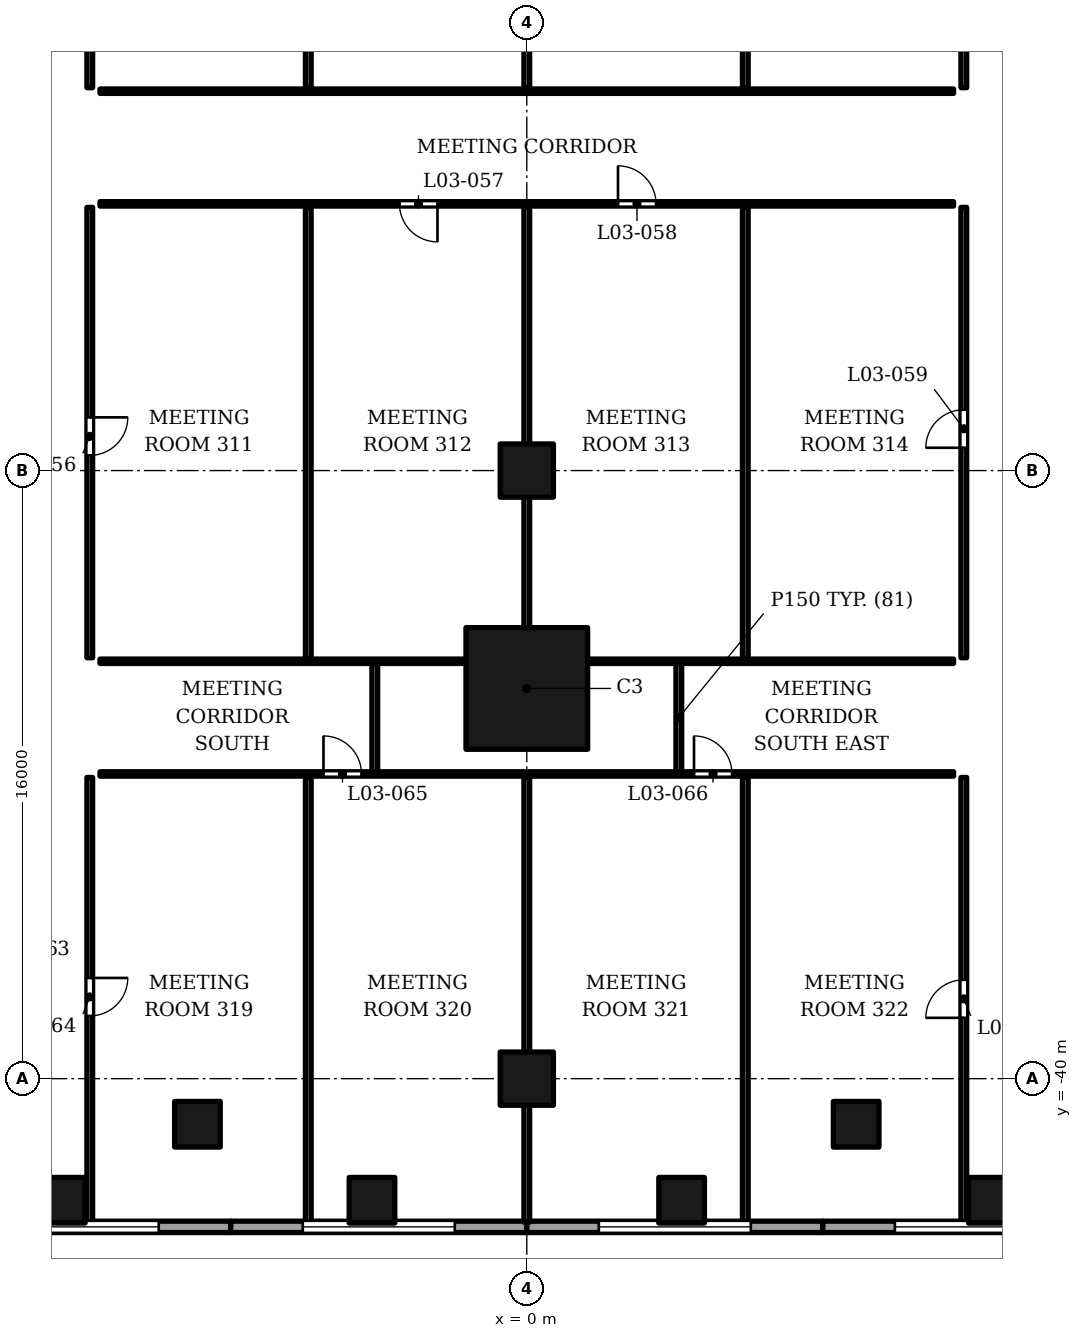
"""IFC4 building model, lengths in metres.
Left out: names, types, materials, properties, quantities, classifications, styles, units other than length and angle.
Written with IfcOpenShell. Run it as: python <this file> out.ifc"""

import sys

from ifc_helpers import new_model, si_unit, direction, frame, frame_2d, origin, origin_2d, place, context, subcontext, project, spatial, rectangle, extrude, element, fill, save


model = new_model("IFC4")
c1 = context("Model", 3, precision=1e-05, world=origin(), true_north=direction((0.0, 1.0)))
c2 = subcontext(c1, "Body", "Model", "MODEL_VIEW")
j1 = project(units=[si_unit("LENGTHUNIT", "METRE"), si_unit("PLANEANGLEUNIT", "RADIAN")], contexts=[c1])
p1 = place(None, origin())
s1 = spatial("IfcSite", under=j1, at=p1, CompositionType="ELEMENT")
p2 = place(p1, origin())
s2 = spatial("IfcBuilding", under=s1, at=p2, CompositionType="ELEMENT")
p3 = place(p2, frame((0.0, 0.0, 29.0)))
s3 = spatial("IfcBuildingStorey", under=s2, at=p3, CompositionType="ELEMENT", Elevation=29.0)
for number, where, z_axis, x_axis in (
    (1, (0.0, -40.0, 0.0), (0.0, 0.0, 1.0), (1.0, 0.0, 0.0)),
    (2, (0.0, -24.0, 0.0), (0.0, 0.0, 1.0), (1.0, 0.0, 0.0)),
):
    element("IfcColumn", number, at=place(p3, frame(where, z_axis=z_axis, x_axis=x_axis)), inside=s3, PredefinedType="COLUMN", context=c2, shape_type="SweptSolid", body=[
        extrude(rectangle(XDim=1.4, YDim=1.4, at=origin_2d()), origin(), (0.0, 0.0, 1.0), 5.5),
    ])
for number, where, z_axis, x_axis in (
    (3, (8.667, -41.2, 0.0), (0.0, 0.0, 1.0), (1.0, 0.0, 0.0)),
    (4, (-8.667, -41.2, 0.0), (0.0, 0.0, 1.0), (1.0, 0.0, 0.0)),
    (5, (12.223, -43.2, 0.0), (0.0, 0.0, 1.0), (1.0, 0.0, 0.0)),
    (6, (4.074, -43.2, 0.0), (0.0, 0.0, 1.0), (1.0, 0.0, 0.0)),
    (7, (-4.074, -43.2, 0.0), (0.0, 0.0, 1.0), (1.0, 0.0, 0.0)),
    (8, (-12.223, -43.2, 0.0), (0.0, 0.0, 1.0), (1.0, 0.0, 0.0)),
):
    element("IfcColumn", number, at=place(p3, frame(where, z_axis=z_axis, x_axis=x_axis)), inside=s3, PredefinedType="COLUMN", context=c2, shape_type="SweptSolid", body=[
        extrude(rectangle(XDim=1.2, YDim=1.2, at=origin_2d()), origin(), (0.0, 0.0, 1.0), 5.5),
    ])
p4 = place(p3, frame((0.0, -29.733, 0.0), z_axis=(0.0, 0.0, 1.0), x_axis=(0.0, 1.0, 0.0)))
e9 = element("IfcColumn", 9, at=p4, inside=s3, PredefinedType="COLUMN", context=c2, shape_type="SweptSolid", body=[
    extrude(rectangle(XDim=3.2, YDim=3.2, at=origin_2d()), origin(), (0.0, 0.0, 1.0), 5.5),
])
p5 = place(p3, frame((-15.58, -43.9, 0.0), z_axis=(0.0, 0.0, 1.0), x_axis=(1.0, 0.0, 0.0)))
e10 = element("IfcWall", 10, at=p5, inside=s3, PredefinedType="SOLIDWALL", context=c2, shape_type="SweptSolid", body=[
    extrude(rectangle(XDim=7.79, YDim=0.3, at=frame_2d((3.895, 0.0))), origin(), (0.0, 0.0, 1.0), 4.1),
])
p6 = place(p5, frame((1.895, 0.0, 1.0)))
e11 = element("IfcOpeningElement", 11, at=p6, cuts=e10, PredefinedType="OPENING", context=c2, shape_type="SweptSolid", body=[
    extrude(rectangle(XDim=4.0, YDim=1.8, at=frame_2d((2.0, 0.9))), frame((0.0, 0.16, 0.0), z_axis=(0.0, -1.0, 0.0), x_axis=(1.0, 0.0, 0.0)), (0.0, 0.0, 1.0), 0.32),
])
p7 = place(p3, frame((-7.79, -43.9, 0.0), z_axis=(0.0, 0.0, 1.0), x_axis=(1.0, 0.0, 0.0)))
e12 = element("IfcWall", 12, at=p7, inside=s3, PredefinedType="SOLIDWALL", context=c2, shape_type="SweptSolid", body=[
    extrude(rectangle(XDim=7.79, YDim=0.3, at=frame_2d((3.895, 0.0))), origin(), (0.0, 0.0, 1.0), 4.1),
])
p8 = place(p7, frame((1.895, 0.0, 1.0)))
e13 = element("IfcOpeningElement", 13, at=p8, cuts=e12, PredefinedType="OPENING", context=c2, shape_type="SweptSolid", body=[
    extrude(rectangle(XDim=4.0, YDim=1.8, at=frame_2d((2.0, 0.9))), frame((0.0, 0.16, 0.0), z_axis=(0.0, -1.0, 0.0), x_axis=(1.0, 0.0, 0.0)), (0.0, 0.0, 1.0), 0.32),
])
p9 = place(p3, frame((0.0, -43.9, 0.0), z_axis=(0.0, 0.0, 1.0), x_axis=(1.0, 0.0, 0.0)))
e14 = element("IfcWall", 14, at=p9, inside=s3, PredefinedType="SOLIDWALL", context=c2, shape_type="SweptSolid", body=[
    extrude(rectangle(XDim=7.79, YDim=0.3, at=frame_2d((3.895, 0.0))), origin(), (0.0, 0.0, 1.0), 4.1),
])
p10 = place(p9, frame((1.895, 0.0, 1.0)))
e15 = element("IfcOpeningElement", 15, at=p10, cuts=e14, PredefinedType="OPENING", context=c2, shape_type="SweptSolid", body=[
    extrude(rectangle(XDim=4.0, YDim=1.8, at=frame_2d((2.0, 0.9))), frame((0.0, 0.16, 0.0), z_axis=(0.0, -1.0, 0.0), x_axis=(1.0, 0.0, 0.0)), (0.0, 0.0, 1.0), 0.32),
])
p11 = place(p3, frame((7.79, -43.9, 0.0), z_axis=(0.0, 0.0, 1.0), x_axis=(1.0, 0.0, 0.0)))
e16 = element("IfcWall", 16, at=p11, inside=s3, PredefinedType="SOLIDWALL", context=c2, shape_type="SweptSolid", body=[
    extrude(rectangle(XDim=7.79, YDim=0.3, at=frame_2d((3.895, 0.0))), origin(), (0.0, 0.0, 1.0), 4.1),
])
p12 = place(p11, frame((1.895, 0.0, 1.0)))
e17 = element("IfcOpeningElement", 17, at=p12, cuts=e16, PredefinedType="OPENING", context=c2, shape_type="SweptSolid", body=[
    extrude(rectangle(XDim=4.0, YDim=1.8, at=frame_2d((2.0, 0.9))), frame((0.0, 0.16, 0.0), z_axis=(0.0, -1.0, 0.0), x_axis=(1.0, 0.0, 0.0)), (0.0, 0.0, 1.0), 0.32),
])
p13 = place(p3, frame((-11.5, -43.77, 0.0), z_axis=(0.0, 0.0, 1.0), x_axis=(0.0, 1.0, 0.0)))
e18 = element("IfcWall", 18, at=p13, inside=s3, PredefinedType="PARTITIONING", context=c2, shape_type="SweptSolid", body=[
    extrude(rectangle(XDim=11.695, YDim=0.15, at=frame_2d((5.848, 0.0))), origin(), (0.0, 0.0, 1.0), 3.85),
])
p14 = place(p13, frame((5.42, 0.0, 0.0)))
e19 = element("IfcOpeningElement", 19, at=p14, cuts=e18, PredefinedType="OPENING", context=c2, shape_type="SweptSolid", body=[
    extrude(rectangle(XDim=1.0, YDim=2.1, at=frame_2d((0.5, 1.05))), frame((0.0, 0.085, 0.0), z_axis=(0.0, -1.0, 0.0), x_axis=(1.0, 0.0, 0.0)), (0.0, 0.0, 1.0), 0.17),
])
p15 = place(p3, frame((-5.75, -43.77, 0.0), z_axis=(0.0, 0.0, 1.0), x_axis=(0.0, 1.0, 0.0)))
e20 = element("IfcWall", 20, at=p15, inside=s3, PredefinedType="PARTITIONING", context=c2, shape_type="SweptSolid", body=[
    extrude(rectangle(XDim=11.695, YDim=0.15, at=frame_2d((5.848, 0.0))), origin(), (0.0, 0.0, 1.0), 3.85),
])
p16 = place(p3, frame((0.0, -43.775, 0.0), z_axis=(0.0, 0.0, 1.0), x_axis=(0.0, 1.0, 0.0)))
e21 = element("IfcWall", 21, at=p16, inside=s3, PredefinedType="PARTITIONING", context=c2, shape_type="SweptSolid", body=[
    extrude(rectangle(XDim=3.075, YDim=0.15, at=frame_2d((1.538, 0.0))), origin(), (0.0, 0.0, 1.0), 3.85),
])
p17 = place(p3, frame((5.75, -43.77, 0.0), z_axis=(0.0, 0.0, 1.0), x_axis=(0.0, 1.0, 0.0)))
e22 = element("IfcWall", 22, at=p17, inside=s3, PredefinedType="PARTITIONING", context=c2, shape_type="SweptSolid", body=[
    extrude(rectangle(XDim=11.695, YDim=0.15, at=frame_2d((5.848, 0.0))), origin(), (0.0, 0.0, 1.0), 3.85),
])
p18 = place(p3, frame((11.5, -43.77, 0.0), z_axis=(0.0, 0.0, 1.0), x_axis=(0.0, 1.0, 0.0)))
e23 = element("IfcWall", 23, at=p18, inside=s3, PredefinedType="PARTITIONING", context=c2, shape_type="SweptSolid", body=[
    extrude(rectangle(XDim=11.695, YDim=0.15, at=frame_2d((5.848, 0.0))), origin(), (0.0, 0.0, 1.0), 3.85),
])
p19 = place(p18, frame((5.37, 0.0, 0.0)))
e24 = element("IfcOpeningElement", 24, at=p19, cuts=e23, PredefinedType="OPENING", context=c2, shape_type="SweptSolid", body=[
    extrude(rectangle(XDim=1.0, YDim=2.1, at=frame_2d((0.5, 1.05))), frame((0.0, 0.085, 0.0), z_axis=(0.0, -1.0, 0.0), x_axis=(1.0, 0.0, 0.0)), (0.0, 0.0, 1.0), 0.17),
])
p20 = place(p3, frame((0.0, -39.3, 0.0), z_axis=(0.0, 0.0, 1.0), x_axis=(0.0, 1.0, 0.0)))
e25 = element("IfcWall", 25, at=p20, inside=s3, PredefinedType="PARTITIONING", context=c2, shape_type="SweptSolid", body=[
    extrude(rectangle(XDim=7.225, YDim=0.15, at=frame_2d((3.613, 0.0))), origin(), (0.0, 0.0, 1.0), 3.85),
])
p21 = place(p3, frame((-11.23, -31.982, 0.0), z_axis=(0.0, 0.0, 1.0), x_axis=(1.0, 0.0, 0.0)))
e26 = element("IfcWall", 26, at=p21, inside=s3, PredefinedType="PARTITIONING", context=c2, shape_type="SweptSolid", body=[
    extrude(rectangle(XDim=22.46, YDim=0.115, at=frame_2d((11.23, 0.0))), origin(), (0.0, 0.0, 1.0), 3.85),
])
p22 = place(p21, frame((5.88, 0.0, 0.0)))
e27 = element("IfcOpeningElement", 27, at=p22, cuts=e26, PredefinedType="OPENING", context=c2, shape_type="SweptSolid", body=[
    extrude(rectangle(XDim=1.0, YDim=2.1, at=frame_2d((0.5, 1.05))), frame((0.0, 0.067, 0.0), z_axis=(0.0, -1.0, 0.0), x_axis=(1.0, 0.0, 0.0)), (0.0, 0.0, 1.0), 0.135),
])
p23 = place(p21, frame((15.63, 0.0, 0.0)))
e28 = element("IfcOpeningElement", 28, at=p23, cuts=e26, PredefinedType="OPENING", context=c2, shape_type="SweptSolid", body=[
    extrude(rectangle(XDim=1.0, YDim=2.1, at=frame_2d((0.5, 1.05))), frame((0.0, 0.067, 0.0), z_axis=(0.0, -1.0, 0.0), x_axis=(1.0, 0.0, 0.0)), (0.0, 0.0, 1.0), 0.135),
])
for number, where, z_axis, x_axis in (
    (29, (-4.0, -31.925, 0.0), (0.0, 0.0, 1.0), (0.0, 1.0, 0.0)),
    (30, (4.0, -31.925, 0.0), (0.0, 0.0, 1.0), (0.0, 1.0, 0.0)),
):
    element("IfcWall", number, at=place(p3, frame(where, z_axis=z_axis, x_axis=x_axis)), inside=s3, PredefinedType="PARTITIONING", context=c2, shape_type="SweptSolid", body=[
        extrude(rectangle(XDim=2.85, YDim=0.15, at=frame_2d((1.425, 0.0))), origin(), (0.0, 0.0, 1.0), 5.05),
    ])
for number, where, z_axis, x_axis in (
    (31, (-11.23, -29.018, 0.0), (0.0, 0.0, 1.0), (1.0, 0.0, 0.0)),
    (32, (1.6, -29.018, 0.0), (0.0, 0.0, 1.0), (1.0, 0.0, 0.0)),
):
    element("IfcWall", number, at=place(p3, frame(where, z_axis=z_axis, x_axis=x_axis)), inside=s3, PredefinedType="PARTITIONING", context=c2, shape_type="SweptSolid", body=[
        extrude(rectangle(XDim=9.63, YDim=0.115, at=frame_2d((4.815, 0.0))), origin(), (0.0, 0.0, 1.0), 4.15),
    ])
p24 = place(p3, frame((-11.5, -28.925, 0.0), z_axis=(0.0, 0.0, 1.0), x_axis=(0.0, 1.0, 0.0)))
e33 = element("IfcWall", 33, at=p24, inside=s3, PredefinedType="PARTITIONING", context=c2, shape_type="SweptSolid", body=[
    extrude(rectangle(XDim=11.85, YDim=0.15, at=frame_2d((5.925, 0.0))), origin(), (0.0, 0.0, 1.0), 3.85),
])
p25 = place(p24, frame((5.325, 0.0, 0.0)))
e34 = element("IfcOpeningElement", 34, at=p25, cuts=e33, PredefinedType="OPENING", context=c2, shape_type="SweptSolid", body=[
    extrude(rectangle(XDim=1.0, YDim=2.1, at=frame_2d((0.5, 1.05))), frame((0.0, 0.085, 0.0), z_axis=(0.0, -1.0, 0.0), x_axis=(1.0, 0.0, 0.0)), (0.0, 0.0, 1.0), 0.17),
])
for number, where, z_axis, x_axis in (
    (35, (-5.75, -28.925, 0.0), (0.0, 0.0, 1.0), (0.0, 1.0, 0.0)),
    (36, (5.75, -28.925, 0.0), (0.0, 0.0, 1.0), (0.0, 1.0, 0.0)),
):
    element("IfcWall", number, at=place(p3, frame(where, z_axis=z_axis, x_axis=x_axis)), inside=s3, PredefinedType="PARTITIONING", context=c2, shape_type="SweptSolid", body=[
        extrude(rectangle(XDim=11.85, YDim=0.15, at=frame_2d((5.925, 0.0))), origin(), (0.0, 0.0, 1.0), 3.85),
    ])
p26 = place(p3, frame((11.5, -28.925, 0.0), z_axis=(0.0, 0.0, 1.0), x_axis=(0.0, 1.0, 0.0)))
e37 = element("IfcWall", 37, at=p26, inside=s3, PredefinedType="PARTITIONING", context=c2, shape_type="SweptSolid", body=[
    extrude(rectangle(XDim=11.85, YDim=0.15, at=frame_2d((5.925, 0.0))), origin(), (0.0, 0.0, 1.0), 3.85),
])
p27 = place(p26, frame((5.525, 0.0, 0.0)))
e38 = element("IfcOpeningElement", 38, at=p27, cuts=e37, PredefinedType="OPENING", context=c2, shape_type="SweptSolid", body=[
    extrude(rectangle(XDim=1.0, YDim=2.1, at=frame_2d((0.5, 1.05))), frame((0.0, 0.085, 0.0), z_axis=(0.0, -1.0, 0.0), x_axis=(1.0, 0.0, 0.0)), (0.0, 0.0, 1.0), 0.17),
])
p28 = place(p3, frame((0.0, -28.133, 0.0), z_axis=(0.0, 0.0, 1.0), x_axis=(0.0, 1.0, 0.0)))
e39 = element("IfcWall", 39, at=p28, inside=s3, PredefinedType="PARTITIONING", context=c2, shape_type="SweptSolid", body=[
    extrude(rectangle(XDim=3.433, YDim=0.15, at=frame_2d((1.717, 0.0))), origin(), (0.0, 0.0, 1.0), 3.85),
])
p29 = place(p3, frame((0.0, -23.3, 0.0), z_axis=(0.0, 0.0, 1.0), x_axis=(0.0, 1.0, 0.0)))
e40 = element("IfcWall", 40, at=p29, inside=s3, PredefinedType="PARTITIONING", context=c2, shape_type="SweptSolid", body=[
    extrude(rectangle(XDim=6.225, YDim=0.15, at=frame_2d((3.113, 0.0))), origin(), (0.0, 0.0, 1.0), 3.85),
])
p30 = place(p3, frame((-11.23, -16.982, 0.0), z_axis=(0.0, 0.0, 1.0), x_axis=(1.0, 0.0, 0.0)))
e41 = element("IfcWall", 41, at=p30, inside=s3, PredefinedType="PARTITIONING", context=c2, shape_type="SweptSolid", body=[
    extrude(rectangle(XDim=22.46, YDim=0.115, at=frame_2d((11.23, 0.0))), origin(), (0.0, 0.0, 1.0), 3.85),
])
p31 = place(p30, frame((7.88, 0.0, 0.0)))
e42 = element("IfcOpeningElement", 42, at=p31, cuts=e41, PredefinedType="OPENING", context=c2, shape_type="SweptSolid", body=[
    extrude(rectangle(XDim=1.0, YDim=2.1, at=frame_2d((0.5, 1.05))), frame((0.0, 0.067, 0.0), z_axis=(0.0, -1.0, 0.0), x_axis=(1.0, 0.0, 0.0)), (0.0, 0.0, 1.0), 0.135),
])
p32 = place(p30, frame((13.63, 0.0, 0.0)))
e43 = element("IfcOpeningElement", 43, at=p32, cuts=e41, PredefinedType="OPENING", context=c2, shape_type="SweptSolid", body=[
    extrude(rectangle(XDim=1.0, YDim=2.1, at=frame_2d((0.5, 1.05))), frame((0.0, 0.067, 0.0), z_axis=(0.0, -1.0, 0.0), x_axis=(1.0, 0.0, 0.0)), (0.0, 0.0, 1.0), 0.135),
])
p33 = place(p3, frame((-11.23, -14.018, 0.0), z_axis=(0.0, 0.0, 1.0), x_axis=(1.0, 0.0, 0.0)))
e44 = element("IfcWall", 44, at=p33, inside=s3, PredefinedType="PARTITIONING", context=c2, shape_type="SweptSolid", body=[
    extrude(rectangle(XDim=22.46, YDim=0.115, at=frame_2d((11.23, 0.0))), origin(), (0.0, 0.0, 1.0), 3.85),
])
p34 = place(p3, frame((-11.5, -13.925, 0.0), z_axis=(0.0, 0.0, 1.0), x_axis=(0.0, 1.0, 0.0)))
e45 = element("IfcWall", 45, at=p34, inside=s3, PredefinedType="PARTITIONING", context=c2, shape_type="SweptSolid", body=[
    extrude(rectangle(XDim=11.85, YDim=0.15, at=frame_2d((5.925, 0.0))), origin(), (0.0, 0.0, 1.0), 3.85),
])
p35 = place(p34, frame((5.325, 0.0, 0.0)))
e46 = element("IfcOpeningElement", 46, at=p35, cuts=e45, PredefinedType="OPENING", context=c2, shape_type="SweptSolid", body=[
    extrude(rectangle(XDim=1.0, YDim=2.1, at=frame_2d((0.5, 1.05))), frame((0.0, 0.085, 0.0), z_axis=(0.0, -1.0, 0.0), x_axis=(1.0, 0.0, 0.0)), (0.0, 0.0, 1.0), 0.17),
])
p36 = place(p3, frame((-5.75, -13.925, 0.0), z_axis=(0.0, 0.0, 1.0), x_axis=(0.0, 1.0, 0.0)))
e47 = element("IfcWall", 47, at=p36, inside=s3, PredefinedType="PARTITIONING", context=c2, shape_type="SweptSolid", body=[
    extrude(rectangle(XDim=11.85, YDim=0.15, at=frame_2d((5.925, 0.0))), origin(), (0.0, 0.0, 1.0), 3.85),
])
p37 = place(p3, frame((0.0, -13.925, 0.0), z_axis=(0.0, 0.0, 1.0), x_axis=(0.0, 1.0, 0.0)))
e48 = element("IfcWall", 48, at=p37, inside=s3, PredefinedType="PARTITIONING", context=c2, shape_type="SweptSolid", body=[
    extrude(rectangle(XDim=1.125, YDim=0.15, at=frame_2d((0.562, 0.0))), origin(), (0.0, 0.0, 1.0), 3.85),
])
p38 = place(p3, frame((5.75, -13.925, 0.0), z_axis=(0.0, 0.0, 1.0), x_axis=(0.0, 1.0, 0.0)))
e49 = element("IfcWall", 49, at=p38, inside=s3, PredefinedType="PARTITIONING", context=c2, shape_type="SweptSolid", body=[
    extrude(rectangle(XDim=11.85, YDim=0.15, at=frame_2d((5.925, 0.0))), origin(), (0.0, 0.0, 1.0), 3.85),
])
p39 = place(p3, frame((11.5, -13.925, 0.0), z_axis=(0.0, 0.0, 1.0), x_axis=(0.0, 1.0, 0.0)))
e50 = element("IfcWall", 50, at=p39, inside=s3, PredefinedType="PARTITIONING", context=c2, shape_type="SweptSolid", body=[
    extrude(rectangle(XDim=11.85, YDim=0.15, at=frame_2d((5.925, 0.0))), origin(), (0.0, 0.0, 1.0), 3.85),
])
p40 = place(p39, frame((5.525, 0.0, 0.0)))
e51 = element("IfcOpeningElement", 51, at=p40, cuts=e50, PredefinedType="OPENING", context=c2, shape_type="SweptSolid", body=[
    extrude(rectangle(XDim=1.0, YDim=2.1, at=frame_2d((0.5, 1.05))), frame((0.0, 0.085, 0.0), z_axis=(0.0, -1.0, 0.0), x_axis=(1.0, 0.0, 0.0)), (0.0, 0.0, 1.0), 0.17),
])
p41 = place(p6, origin())
e52 = element("IfcWindow", 52, at=p41, inside=s3, PartitioningType="SINGLE_PANEL", PredefinedType="WINDOW", context=c2, shape_type="SweptSolid", body=[
    extrude(rectangle(XDim=4.0, YDim=1.8, at=frame_2d((2.0, 0.9))), frame((0.0, 0.03, 0.0), z_axis=(0.0, -1.0, 0.0), x_axis=(1.0, 0.0, 0.0)), (0.0, 0.0, 1.0), 0.06),
])
fill(e11, e52)
p42 = place(p8, origin())
e53 = element("IfcWindow", 53, at=p42, inside=s3, PartitioningType="SINGLE_PANEL", PredefinedType="WINDOW", context=c2, shape_type="SweptSolid", body=[
    extrude(rectangle(XDim=4.0, YDim=1.8, at=frame_2d((2.0, 0.9))), frame((0.0, 0.03, 0.0), z_axis=(0.0, -1.0, 0.0), x_axis=(1.0, 0.0, 0.0)), (0.0, 0.0, 1.0), 0.06),
])
fill(e13, e53)
p43 = place(p10, origin())
e54 = element("IfcWindow", 54, at=p43, inside=s3, PartitioningType="SINGLE_PANEL", PredefinedType="WINDOW", context=c2, shape_type="SweptSolid", body=[
    extrude(rectangle(XDim=4.0, YDim=1.8, at=frame_2d((2.0, 0.9))), frame((0.0, 0.03, 0.0), z_axis=(0.0, -1.0, 0.0), x_axis=(1.0, 0.0, 0.0)), (0.0, 0.0, 1.0), 0.06),
])
fill(e15, e54)
p44 = place(p12, origin())
e55 = element("IfcWindow", 55, at=p44, inside=s3, PartitioningType="SINGLE_PANEL", PredefinedType="WINDOW", context=c2, shape_type="SweptSolid", body=[
    extrude(rectangle(XDim=4.0, YDim=1.8, at=frame_2d((2.0, 0.9))), frame((0.0, 0.03, 0.0), z_axis=(0.0, -1.0, 0.0), x_axis=(1.0, 0.0, 0.0)), (0.0, 0.0, 1.0), 0.06),
])
fill(e17, e55)
p45 = place(p25, origin())
e56 = element("IfcDoor", 56, at=p45, inside=s3, OperationType="SINGLE_SWING_RIGHT", PredefinedType="DOOR", context=c2, shape_type="SweptSolid", body=[
    extrude(rectangle(XDim=1.0, YDim=2.1, at=frame_2d((0.5, 1.05))), frame((0.0, 0.025, 0.0), z_axis=(0.0, -1.0, 0.0), x_axis=(1.0, 0.0, 0.0)), (0.0, 0.0, 1.0), 0.05),
])
fill(e34, e56)
p46 = place(p31, origin())
e57 = element("IfcDoor", 57, at=p46, inside=s3, OperationType="SINGLE_SWING_RIGHT", PredefinedType="DOOR", context=c2, shape_type="SweptSolid", body=[
    extrude(rectangle(XDim=1.0, YDim=2.1, at=frame_2d((0.5, 1.05))), frame((0.0, 0.025, 0.0), z_axis=(0.0, -1.0, 0.0), x_axis=(1.0, 0.0, 0.0)), (0.0, 0.0, 1.0), 0.05),
])
fill(e42, e57)
p47 = place(p32, origin())
e58 = element("IfcDoor", 58, at=p47, inside=s3, OperationType="SINGLE_SWING_LEFT", PredefinedType="DOOR", context=c2, shape_type="SweptSolid", body=[
    extrude(rectangle(XDim=1.0, YDim=2.1, at=frame_2d((0.5, 1.05))), frame((0.0, 0.025, 0.0), z_axis=(0.0, -1.0, 0.0), x_axis=(1.0, 0.0, 0.0)), (0.0, 0.0, 1.0), 0.05),
])
fill(e43, e58)
p48 = place(p27, origin())
e59 = element("IfcDoor", 59, at=p48, inside=s3, OperationType="SINGLE_SWING_LEFT", PredefinedType="DOOR", context=c2, shape_type="SweptSolid", body=[
    extrude(rectangle(XDim=1.0, YDim=2.1, at=frame_2d((0.5, 1.05))), frame((0.0, 0.025, 0.0), z_axis=(0.0, -1.0, 0.0), x_axis=(1.0, 0.0, 0.0)), (0.0, 0.0, 1.0), 0.05),
])
fill(e38, e59)
p49 = place(p14, origin())
e60 = element("IfcDoor", 60, at=p49, inside=s3, OperationType="SINGLE_SWING_RIGHT", PredefinedType="DOOR", context=c2, shape_type="SweptSolid", body=[
    extrude(rectangle(XDim=1.0, YDim=2.1, at=frame_2d((0.5, 1.05))), frame((0.0, 0.025, 0.0), z_axis=(0.0, -1.0, 0.0), x_axis=(1.0, 0.0, 0.0)), (0.0, 0.0, 1.0), 0.05),
])
fill(e19, e60)
p50 = place(p22, origin())
e61 = element("IfcDoor", 61, at=p50, inside=s3, OperationType="SINGLE_SWING_LEFT", PredefinedType="DOOR", context=c2, shape_type="SweptSolid", body=[
    extrude(rectangle(XDim=1.0, YDim=2.1, at=frame_2d((0.5, 1.05))), frame((0.0, 0.025, 0.0), z_axis=(0.0, -1.0, 0.0), x_axis=(1.0, 0.0, 0.0)), (0.0, 0.0, 1.0), 0.05),
])
fill(e27, e61)
p51 = place(p23, origin())
e62 = element("IfcDoor", 62, at=p51, inside=s3, OperationType="SINGLE_SWING_LEFT", PredefinedType="DOOR", context=c2, shape_type="SweptSolid", body=[
    extrude(rectangle(XDim=1.0, YDim=2.1, at=frame_2d((0.5, 1.05))), frame((0.0, 0.025, 0.0), z_axis=(0.0, -1.0, 0.0), x_axis=(1.0, 0.0, 0.0)), (0.0, 0.0, 1.0), 0.05),
])
fill(e28, e62)
p52 = place(p19, origin())
e63 = element("IfcDoor", 63, at=p52, inside=s3, OperationType="SINGLE_SWING_LEFT", PredefinedType="DOOR", context=c2, shape_type="SweptSolid", body=[
    extrude(rectangle(XDim=1.0, YDim=2.1, at=frame_2d((0.5, 1.05))), frame((0.0, 0.025, 0.0), z_axis=(0.0, -1.0, 0.0), x_axis=(1.0, 0.0, 0.0)), (0.0, 0.0, 1.0), 0.05),
])
fill(e24, e63)
save(model, sys.argv[1])
